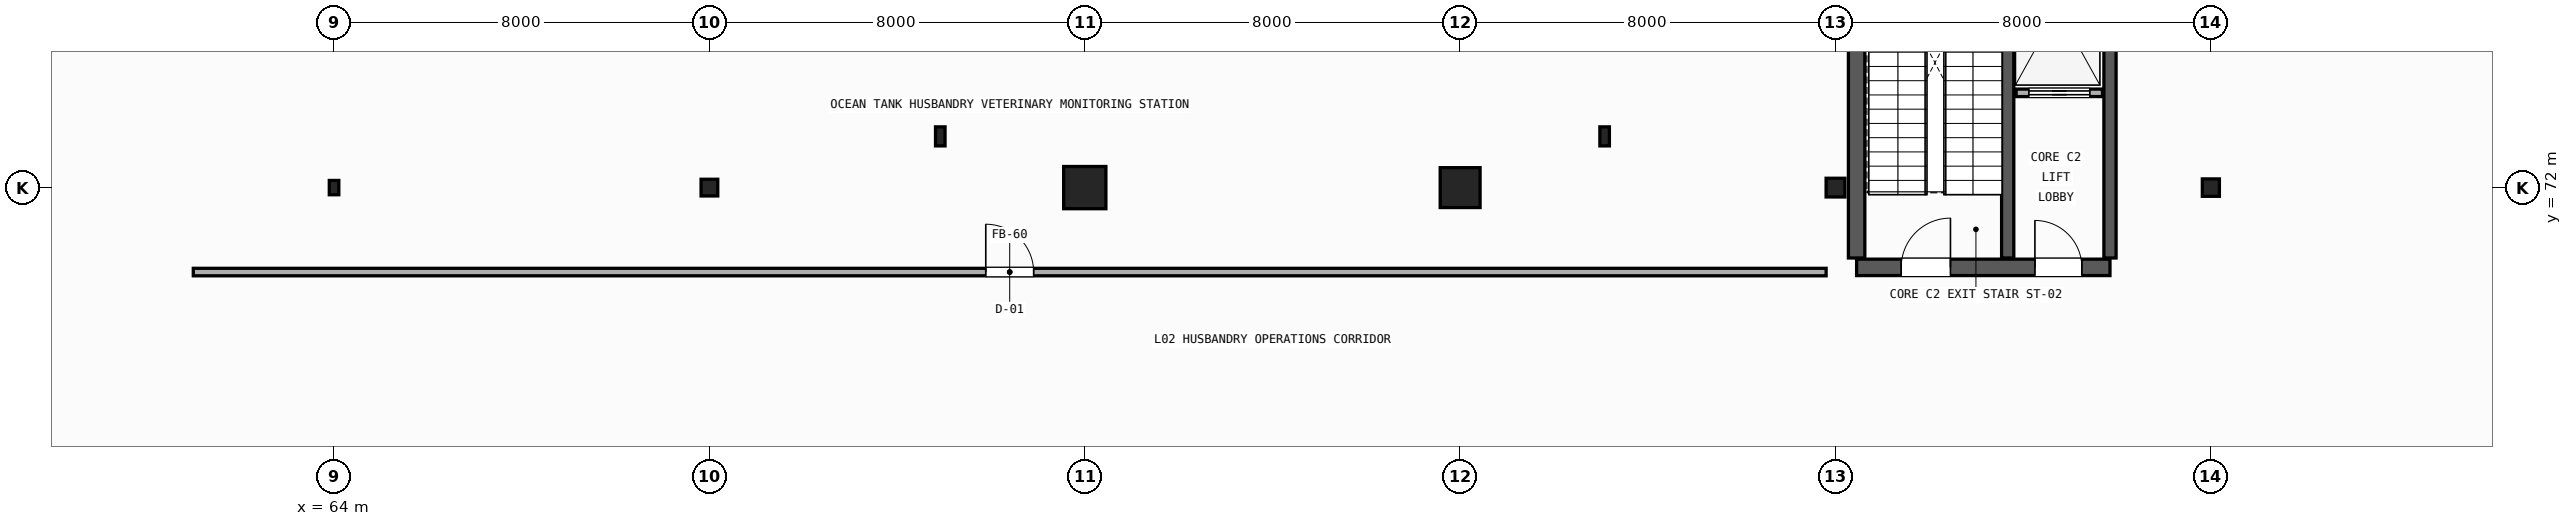
"""IFC4 building model, lengths in metres.
Left out: names, types, materials, properties, quantities, classifications, styles, units other than length and angle.
Written with IfcOpenShell. Run it as: python <this file> out.ifc"""

import sys

from ifc_helpers import new_model, si_unit, direction, frame, frame_2d, origin, origin_2d, place, context, subcontext, project, spatial, rectangle, hollow_rectangle, circle, hollow_circle, i_section, extrude, element, fill, save


model = new_model("IFC4")
c1 = context("Model", 3, precision=1e-05, world=origin(), true_north=direction((0.0, 1.0)))
c2 = subcontext(c1, "Body", "Model", "MODEL_VIEW")
j1 = project(units=[si_unit("LENGTHUNIT", "METRE"), si_unit("PLANEANGLEUNIT", "RADIAN")], contexts=[c1])
p1 = place(None, origin())
s1 = spatial("IfcSite", under=j1, at=p1, CompositionType="ELEMENT")
p2 = place(p1, origin())
s2 = spatial("IfcBuilding", under=s1, at=p2, CompositionType="ELEMENT")
p3 = place(p2, frame((0.0, 0.0, 10.2)))
s3 = spatial("IfcBuildingStorey", under=s2, at=p3, CompositionType="ELEMENT", Elevation=10.2)
p4 = place(p3, frame((64.0, 72.0, 0.0), z_axis=(0.0, 0.0, 1.0), x_axis=(1.0, 0.0, 0.0)))
e1 = element("IfcColumn", 1, at=p4, inside=s3, PredefinedType="COLUMN", context=c2, shape_type="SweptSolid", body=[
    extrude(hollow_rectangle(XDim=0.203, YDim=0.305, WallThickness=0.009, InnerFilletRadius=0.009, OuterFilletRadius=0.018, at=origin_2d()), origin(), (0.0, 0.0, 1.0), 4.54),
])
p5 = place(p3, frame((72.0, 72.0, 0.0), z_axis=(0.0, 0.0, 1.0), x_axis=(0.0, 1.0, 0.0)))
e2 = element("IfcColumn", 2, at=p5, inside=s3, PredefinedType="COLUMN", context=c2, shape_type="SweptSolid", body=[
    extrude(hollow_circle(Radius=0.178, WallThickness=0.012, at=origin_2d()), origin(), (0.0, 0.0, 1.0), 4.54),
])
p6 = place(p3, frame((80.0, 72.0, 0.0), z_axis=(0.0, 0.0, 1.0), x_axis=(1.0, 0.0, 0.0)))
e3 = element("IfcColumn", 3, at=p6, inside=s3, PredefinedType="COLUMN", context=c2, shape_type="SweptSolid", body=[
    extrude(rectangle(XDim=0.9, YDim=0.9, at=origin_2d()), origin(), (0.0, 0.0, 1.0), 4.54),
])
p7 = place(p3, frame((88.0, 72.0, 0.0), z_axis=(0.0, 0.0, 1.0), x_axis=(0.0, 1.0, 0.0)))
e4 = element("IfcColumn", 4, at=p7, inside=s3, PredefinedType="COLUMN", context=c2, shape_type="SweptSolid", body=[
    extrude(circle(Radius=0.425, at=origin_2d()), origin(), (0.0, 0.0, 1.0), 4.54),
])
p8 = place(p3, frame((96.0, 72.0, 0.0), z_axis=(0.0, 0.0, 1.0), x_axis=(1.0, 0.0, 0.0)))
e5 = element("IfcColumn", 5, at=p8, inside=s3, PredefinedType="COLUMN", context=c2, shape_type="SweptSolid", body=[
    extrude(i_section(OverallWidth=0.401, OverallDepth=0.399, WebThickness=0.025, FlangeThickness=0.04, FilletRadius=0.015, at=origin_2d()), origin(), (0.0, 0.0, 1.0), 4.54),
])
p9 = place(p3, frame((104.0, 72.0, 0.0), z_axis=(0.0, 0.0, 1.0), x_axis=(0.0, 1.0, 0.0)))
e6 = element("IfcColumn", 6, at=p9, inside=s3, PredefinedType="COLUMN", context=c2, shape_type="SweptSolid", body=[
    extrude(i_section(OverallWidth=0.371, OverallDepth=0.364, WebThickness=0.013, FlangeThickness=0.022, FilletRadius=0.015, at=origin_2d()), origin(), (0.0, 0.0, 1.0), 4.54),
])
for number, where, z_axis, x_axis in (
    (7, (91.08, 73.092, 0.0), (0.0, 0.0, 1.0), (1.0, 0.0, 0.0)),
    (8, (76.92, 73.092, 0.0), (0.0, 0.0, 1.0), (1.0, 0.0, 0.0)),
):
    element("IfcColumn", number, at=place(p3, frame(where, z_axis=z_axis, x_axis=x_axis)), inside=s3, PredefinedType="COLUMN", context=c2, shape_type="SweptSolid", body=[
        extrude(hollow_rectangle(XDim=0.203, YDim=0.406, WallThickness=0.012, InnerFilletRadius=0.012, OuterFilletRadius=0.024, at=origin_2d()), origin(), (0.0, 0.0, 1.0), 4.52),
    ])
p10 = place(p3, frame((96.45, 70.3, 0.0), z_axis=(0.0, 0.0, 1.0), x_axis=(1.0, 0.0, 0.0)))
e9 = element("IfcWall", 9, at=p10, inside=s3, PredefinedType="SHEAR", context=c2, shape_type="SweptSolid", body=[
    extrude(rectangle(XDim=5.4, YDim=0.35, at=frame_2d((2.7, 0.0))), origin(), (0.0, 0.0, 1.0), 4.53),
])
p11 = place(p10, frame((0.95, 0.0, 0.0)))
e10 = element("IfcOpeningElement", 10, at=p11, cuts=e9, PredefinedType="OPENING", context=c2, shape_type="SweptSolid", body=[
    extrude(rectangle(XDim=1.05, YDim=2.1, at=frame_2d((0.525, 1.05))), frame((0.0, 0.185, 0.0), z_axis=(0.0, -1.0, 0.0), x_axis=(1.0, 0.0, 0.0)), (0.0, 0.0, 1.0), 0.37),
])
p12 = place(p10, frame((3.8, 0.0, 0.0)))
e11 = element("IfcOpeningElement", 11, at=p12, cuts=e9, PredefinedType="OPENING", context=c2, shape_type="SweptSolid", body=[
    extrude(rectangle(XDim=1.0, YDim=2.15, at=frame_2d((0.5, 1.075))), frame((0.0, 0.185, 0.0), z_axis=(0.0, -1.0, 0.0), x_axis=(1.0, 0.0, 0.0)), (0.0, 0.0, 1.0), 0.37),
])
p13 = place(p3, frame((96.45, 70.5, 0.0), z_axis=(0.0, 0.0, 1.0), x_axis=(0.0, 1.0, 0.0)))
e12 = element("IfcWall", 12, at=p13, inside=s3, PredefinedType="SHEAR", context=c2, shape_type="SweptSolid", body=[
    extrude(rectangle(XDim=6.95, YDim=0.35, at=frame_2d((3.475, 0.0))), origin(), (0.0, 0.0, 1.0), 4.53),
])
for number, where, z_axis, x_axis in (
    (13, (101.85, 70.5, 0.0), (0.0, 0.0, 1.0), (0.0, 1.0, 0.0)),
    (14, (99.67, 70.5, 0.0), (0.0, 0.0, 1.0), (0.0, 1.0, 0.0)),
):
    element("IfcWall", number, at=place(p3, frame(where, z_axis=z_axis, x_axis=x_axis)), inside=s3, PredefinedType="SHEAR", context=c2, shape_type="SweptSolid", body=[
        extrude(rectangle(XDim=6.95, YDim=0.26, at=frame_2d((3.475, 0.0))), origin(), (0.0, 0.0, 1.0), 4.53),
    ])
p14 = place(p3, frame((99.85, 74.02, 0.0), z_axis=(0.0, 0.0, 1.0), x_axis=(1.0, 0.0, 0.0)))
e15 = element("IfcWall", 15, at=p14, inside=s3, PredefinedType="PARTITIONING", context=c2, shape_type="SweptSolid", body=[
    extrude(rectangle(XDim=1.84, YDim=0.16, at=frame_2d((0.92, 0.0))), origin(), (0.0, 0.0, 1.0), 3.6),
])
p15 = place(p14, frame((0.27, 0.0, 0.0)))
e16 = element("IfcOpeningElement", 16, at=p15, cuts=e15, PredefinedType="OPENING", context=c2, shape_type="SweptSolid", body=[
    extrude(rectangle(XDim=1.3, YDim=2.2, at=frame_2d((0.65, 1.1))), frame((0.0, 0.09, 0.0), z_axis=(0.0, -1.0, 0.0), x_axis=(1.0, 0.0, 0.0)), (0.0, 0.0, 1.0), 0.18),
])
p16 = place(p3, frame((61.0, 70.2, 0.0), z_axis=(0.0, 0.0, 1.0), x_axis=(1.0, 0.0, 0.0)))
e17 = element("IfcWall", 17, at=p16, inside=s3, PredefinedType="PARTITIONING", context=c2, shape_type="SweptSolid", body=[
    extrude(rectangle(XDim=34.8, YDim=0.16, at=frame_2d((17.4, 0.0))), origin(), (0.0, 0.0, 1.0), 3.822),
])
p17 = place(p16, frame((16.89, 0.0, 0.0)))
e18 = element("IfcOpeningElement", 18, at=p17, cuts=e17, PredefinedType="OPENING", context=c2, shape_type="SweptSolid", body=[
    extrude(rectangle(XDim=1.02, YDim=2.15, at=frame_2d((0.51, 1.075))), frame((0.0, 0.09, 0.0), z_axis=(0.0, -1.0, 0.0), x_axis=(1.0, 0.0, 0.0)), (0.0, 0.0, 1.0), 0.18),
])
p18 = place(p15, origin())
e19 = element("IfcDoor", 19, at=p18, inside=s3, OperationType="SLIDING_TO_LEFT", PredefinedType="DOOR", context=c2, shape_type="SweptSolid", body=[
    extrude(rectangle(XDim=1.3, YDim=2.2, at=frame_2d((0.65, 1.1))), frame((0.0, 0.025, 0.0), z_axis=(0.0, -1.0, 0.0), x_axis=(1.0, 0.0, 0.0)), (0.0, 0.0, 1.0), 0.05),
])
fill(e16, e19)
p19 = place(p11, origin())
e20 = element("IfcDoor", 20, at=p19, inside=s3, OperationType="SINGLE_SWING_RIGHT", PredefinedType="DOOR", context=c2, shape_type="SweptSolid", body=[
    extrude(rectangle(XDim=1.05, YDim=2.1, at=frame_2d((0.525, 1.05))), frame((0.0, 0.025, 0.0), z_axis=(0.0, -1.0, 0.0), x_axis=(1.0, 0.0, 0.0)), (0.0, 0.0, 1.0), 0.05),
])
fill(e10, e20)
p20 = place(p12, origin())
e21 = element("IfcDoor", 21, at=p20, inside=s3, OperationType="SINGLE_SWING_LEFT", PredefinedType="DOOR", context=c2, shape_type="SweptSolid", body=[
    extrude(rectangle(XDim=1.0, YDim=2.15, at=frame_2d((0.5, 1.075))), frame((0.0, 0.025, 0.0), z_axis=(0.0, -1.0, 0.0), x_axis=(1.0, 0.0, 0.0)), (0.0, 0.0, 1.0), 0.05),
])
fill(e11, e21)
p21 = place(p17, origin())
e22 = element("IfcDoor", 22, at=p21, inside=s3, OperationType="SINGLE_SWING_LEFT", PredefinedType="DOOR", context=c2, shape_type="SweptSolid", body=[
    extrude(rectangle(XDim=1.02, YDim=2.15, at=frame_2d((0.51, 1.075))), frame((0.0, 0.025, 0.0), z_axis=(0.0, -1.0, 0.0), x_axis=(1.0, 0.0, 0.0)), (0.0, 0.0, 1.0), 0.05),
])
fill(e18, e22)
save(model, sys.argv[1])
